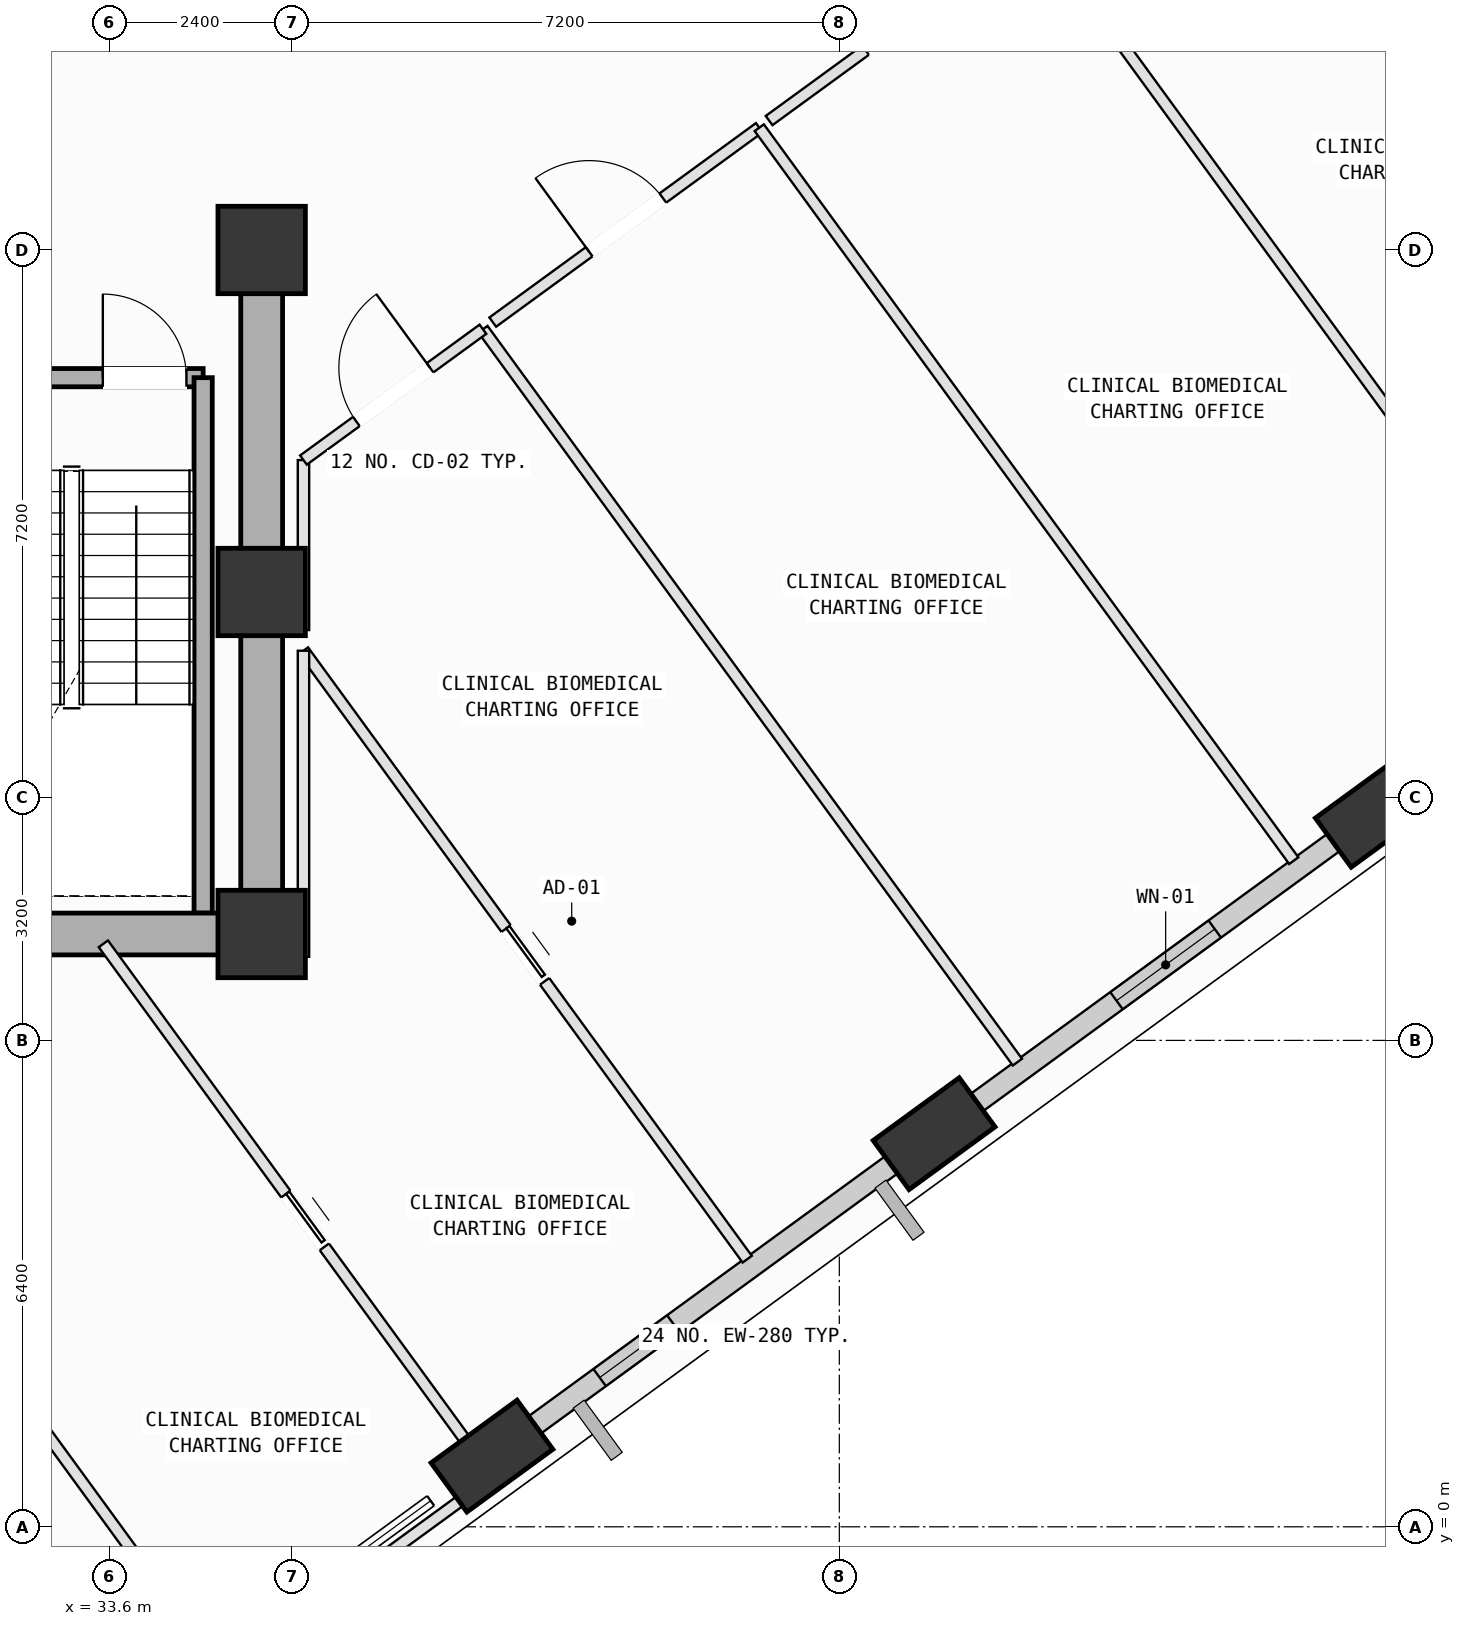
"""IFC4 building model, lengths in metres.
Left out: names, types, materials, properties, quantities, classifications, styles, units other than length and angle.
Written with IfcOpenShell. Run it as: python <this file> out.ifc"""

import sys

from ifc_helpers import new_model, si_unit, direction, frame, frame_2d, origin, origin_2d, place, context, subcontext, project, spatial, rectangle, extrude, element, fill, save


model = new_model("IFC4")
c1 = context("Model", 3, precision=1e-05, world=origin(), true_north=direction((0.0, 1.0)))
c2 = subcontext(c1, "Body", "Model", "MODEL_VIEW")
j1 = project(units=[si_unit("LENGTHUNIT", "METRE"), si_unit("PLANEANGLEUNIT", "RADIAN")], contexts=[c1])
p1 = place(None, origin())
s1 = spatial("IfcSite", under=j1, at=p1, CompositionType="ELEMENT")
p2 = place(p1, origin())
s2 = spatial("IfcBuilding", under=s1, at=p2, CompositionType="ELEMENT")
p3 = place(p2, frame((0.0, 0.0, 177.8)))
s3 = spatial("IfcBuildingStorey", under=s2, at=p3, CompositionType="ELEMENT", Elevation=177.8)
for number, where, z_axis, x_axis in (
    (1, (35.6, 7.8, 0.0), (0.0, 0.0, 1.0), (1.0, 0.0, 0.0)),
    (2, (35.6, 12.3, 0.0), (0.0, 0.0, 1.0), (1.0, 0.0, 0.0)),
    (3, (35.6, 16.8, 0.0), (0.0, 0.0, 1.0), (1.0, 0.0, 0.0)),
):
    element("IfcColumn", number, at=place(p3, frame(where, z_axis=z_axis, x_axis=x_axis)), inside=s3, PredefinedType="COLUMN", context=c2, shape_type="SweptSolid", body=[
        extrude(rectangle(XDim=1.15, YDim=1.15, at=origin_2d()), origin(), (0.0, 0.0, 1.0), 4.0),
    ])
p4 = place(p3, frame((38.63, 0.93, 0.002), z_axis=(0.098283042881, 0.021516510315, 0.994925868226), x_axis=(-0.745440461571, 0.663931067812, 0.059279469018)))
e4 = element("IfcColumn", 4, at=p4, inside=s3, PredefinedType="COLUMN", context=c2, shape_type="SweptSolid", body=[
    extrude(rectangle(XDim=1.4, YDim=0.8, at=origin_2d()), origin(), (0.0, 0.0, 1.0), 4.017),
])
p5 = place(p3, frame((44.448, 5.173, 0.002), z_axis=(0.0805984637, 0.045439284818, 0.995710379098), x_axis=(-0.907854816297, 0.415725530239, 0.054515282577)))
e5 = element("IfcColumn", 5, at=p5, inside=s3, PredefinedType="COLUMN", context=c2, shape_type="SweptSolid", body=[
    extrude(rectangle(XDim=1.4, YDim=0.8, at=origin_2d()), origin(), (0.0, 0.0, 1.0), 4.014),
])
p6 = place(p3, frame((50.265, 9.415, 0.002), z_axis=(0.062891068015, 0.069277491749, 0.995613048679), x_axis=(-0.992538081723, 0.108761006327, 0.055128938255)))
e6 = element("IfcColumn", 6, at=p6, inside=s3, PredefinedType="COLUMN", context=c2, shape_type="SweptSolid", body=[
    extrude(rectangle(XDim=1.4, YDim=0.8, at=origin_2d()), origin(), (0.0, 0.0, 1.0), 4.014),
])
p7 = place(p3, frame((44.196, 4.989, 0.0), z_axis=(0.0, 0.0, 1.0), x_axis=(-0.80798960604, -0.589196738392, 0.0)))
e7 = element("IfcWall", 7, at=p7, inside=s3, PredefinedType="SOLIDWALL", context=c2, shape_type="SweptSolid", body=[
    extrude(rectangle(XDim=6.214, YDim=0.28, at=frame_2d((3.107, 0.0))), origin(), (0.0, 0.0, 1.0), 3.265),
])
p8 = place(p7, frame((3.935, 0.0, 0.75)))
e8 = element("IfcOpeningElement", 8, at=p8, cuts=e7, PredefinedType="OPENING", context=c2, shape_type="SweptSolid", body=[
    extrude(rectangle(XDim=1.2, YDim=1.75, at=frame_2d((0.6, 0.875))), frame((0.0, 0.15, 0.0), z_axis=(0.0, -1.0, 0.0), x_axis=(1.0, 0.0, 0.0)), (0.0, 0.0, 1.0), 0.3),
])
p9 = place(p3, frame((50.014, 9.232, 0.0), z_axis=(0.0, 0.0, 1.0), x_axis=(-0.808000900578, -0.589181249417, 0.0)))
e9 = element("IfcWall", 9, at=p9, inside=s3, PredefinedType="SOLIDWALL", context=c2, shape_type="SweptSolid", body=[
    extrude(rectangle(XDim=6.209, YDim=0.28, at=frame_2d((3.104, 0.0))), origin(), (0.0, 0.0, 1.0), 3.265),
])
p10 = place(p9, frame((2.319, 0.0, 0.75)))
e10 = element("IfcOpeningElement", 10, at=p10, cuts=e9, PredefinedType="OPENING", context=c2, shape_type="SweptSolid", body=[
    extrude(rectangle(XDim=1.6, YDim=1.95, at=frame_2d((0.8, 0.975))), frame((0.0, 0.15, 0.0), z_axis=(0.0, -1.0, 0.0), x_axis=(1.0, 0.0, 0.0)), (0.0, 0.0, 1.0), 0.3),
])
p11 = place(p3, frame((31.37, 15.12, 0.0), z_axis=(0.0, 0.0, 1.0), x_axis=(1.0, 0.0, 0.0)))
e11 = element("IfcWall", 11, at=p11, inside=s3, PredefinedType="SOLIDWALL", context=c2, shape_type="SweptSolid", body=[
    extrude(rectangle(XDim=3.46, YDim=0.24, at=frame_2d((1.73, 0.0))), origin(), (0.0, 0.0, 1.0), 3.78),
])
p12 = place(p11, frame((2.14, 0.0, 0.0)))
e12 = element("IfcOpeningElement", 12, at=p12, cuts=e11, PredefinedType="OPENING", context=c2, shape_type="SweptSolid", body=[
    extrude(rectangle(XDim=1.1, YDim=2.15, at=frame_2d((0.55, 1.075))), frame((0.0, 0.13, 0.0), z_axis=(0.0, -1.0, 0.0), x_axis=(1.0, 0.0, 0.0)), (0.0, 0.0, 1.0), 0.26),
])
p13 = place(p3, frame((34.83, 15.12, 0.0), z_axis=(0.0, 0.0, 1.0), x_axis=(0.0, -1.0, 0.0)))
e13 = element("IfcWall", 13, at=p13, inside=s3, PredefinedType="SOLIDWALL", context=c2, shape_type="SweptSolid", body=[
    extrude(rectangle(XDim=7.045, YDim=0.24, at=frame_2d((3.522, 0.0))), origin(), (0.0, 0.0, 1.0), 3.78),
])
p14 = place(p3, frame((24.8, 7.8, 0.0), z_axis=(0.0, 0.0, 1.0), x_axis=(1.0, 0.0, 0.0)))
e14 = element("IfcWall", 14, at=p14, inside=s3, PredefinedType="SHEAR", context=c2, shape_type="SweptSolid", body=[
    extrude(rectangle(XDim=10.8, YDim=0.55, at=frame_2d((5.4, 0.0))), origin(), (0.0, 0.0, 1.0), 3.78),
])
p15 = place(p3, frame((35.6, 7.8, 0.0), z_axis=(0.0, 0.0, 1.0), x_axis=(0.0, 1.0, 0.0)))
e15 = element("IfcWall", 15, at=p15, inside=s3, PredefinedType="SHEAR", context=c2, shape_type="SweptSolid", body=[
    extrude(rectangle(XDim=9.0, YDim=0.55, at=frame_2d((4.5, 0.0))), origin(), (0.0, 0.0, 1.0), 3.78),
])
p16 = place(p3, frame((28.07, 7.671, 0.0), z_axis=(0.0, 0.0, 1.0), x_axis=(0.589263140304, -0.807941180705, 0.0)))
e16 = element("IfcWall", 16, at=p16, inside=s3, PredefinedType="PARTITIONING", context=c2, shape_type="SweptSolid", body=[
    extrude(rectangle(XDim=11.898, YDim=0.15, at=frame_2d((5.949, 0.0))), origin(), (0.0, 0.0, 1.0), 3.78),
])
p17 = place(p16, frame((5.704, 0.0, 0.0)))
e17 = element("IfcOpeningElement", 17, at=p17, cuts=e16, PredefinedType="OPENING", context=c2, shape_type="SweptSolid", body=[
    extrude(rectangle(XDim=0.86, YDim=2.06, at=frame_2d((0.43, 1.03))), frame((0.0, 0.085, 0.0), z_axis=(0.0, -1.0, 0.0), x_axis=(1.0, 0.0, 0.0)), (0.0, 0.0, 1.0), 0.17),
])
p18 = place(p3, frame((38.636, 0.65, 0.0), z_axis=(0.0, 0.0, 1.0), x_axis=(-0.808045791303, -0.589119681523, 0.0)))
e18 = element("IfcWall", 18, at=p18, inside=s3, PredefinedType="PARTITIONING", context=c2, shape_type="SweptSolid", body=[
    extrude(rectangle(XDim=4.24, YDim=0.15, at=frame_2d((2.12, 0.0))), origin(), (0.0, 0.0, 1.0), 3.265),
])
p19 = place(p3, frame((33.517, 7.671, 0.0), z_axis=(0.0, 0.0, 1.0), x_axis=(0.589139101628, -0.808031632384, 0.0)))
e19 = element("IfcWall", 19, at=p19, inside=s3, PredefinedType="PARTITIONING", context=c2, shape_type="SweptSolid", body=[
    extrude(rectangle(XDim=8.639, YDim=0.15, at=frame_2d((4.32, 0.0))), origin(), (0.0, 0.0, 1.0), 3.78),
])
p20 = place(p19, frame((4.075, 0.0, 0.0)))
e20 = element("IfcOpeningElement", 20, at=p20, cuts=e19, PredefinedType="OPENING", context=c2, shape_type="SweptSolid", body=[
    extrude(rectangle(XDim=0.86, YDim=2.06, at=frame_2d((0.43, 1.03))), frame((0.0, 0.085, 0.0), z_axis=(0.0, -1.0, 0.0), x_axis=(1.0, 0.0, 0.0)), (0.0, 0.0, 1.0), 0.17),
])
p21 = place(p3, frame((36.15, 11.527, 0.0), z_axis=(0.0, 0.0, 1.0), x_axis=(0.589195281256, -0.8079906686, 0.0)))
e21 = element("IfcWall", 21, at=p21, inside=s3, PredefinedType="PARTITIONING", context=c2, shape_type="SweptSolid", body=[
    extrude(rectangle(XDim=9.909, YDim=0.15, at=frame_2d((4.954, 0.0))), origin(), (0.0, 0.0, 1.0), 3.78),
])
p22 = place(p21, frame((4.524, 0.0, 0.0)))
e22 = element("IfcOpeningElement", 22, at=p22, cuts=e21, PredefinedType="OPENING", context=c2, shape_type="SweptSolid", body=[
    extrude(rectangle(XDim=0.86, YDim=2.06, at=frame_2d((0.43, 1.03))), frame((0.0, 0.085, 0.0), z_axis=(0.0, -1.0, 0.0), x_axis=(1.0, 0.0, 0.0)), (0.0, 0.0, 1.0), 0.17),
])
p23 = place(p3, frame((39.31, 1.142, 0.0), z_axis=(0.0, 0.0, 1.0), x_axis=(-0.807530243719, -0.589826165475, 0.0)))
e23 = element("IfcWall", 23, at=p23, inside=s3, PredefinedType="PARTITIONING", context=c2, shape_type="SweptSolid", body=[
    extrude(rectangle(XDim=0.675, YDim=0.15, at=frame_2d((0.337, 0.0))), origin(), (0.0, 0.0, 1.0), 3.265),
])
p24 = place(p3, frame((35.6, 7.5, 0.0), z_axis=(0.0, 0.0, 1.0), x_axis=(1.0, 0.0, 0.0)))
e24 = element("IfcWall", 24, at=p24, inside=s3, PredefinedType="PARTITIONING", context=c2, shape_type="SweptSolid", body=[
    extrude(rectangle(XDim=0.55, YDim=0.15, at=frame_2d((0.275, 0.0))), origin(), (0.0, 0.0, 1.0), 3.065),
])
p25 = place(p3, frame((36.15, 7.5, 0.0), z_axis=(0.0, 0.0, 1.0), x_axis=(0.0, 1.0, 0.0)))
e25 = element("IfcWall", 25, at=p25, inside=s3, PredefinedType="PARTITIONING", context=c2, shape_type="SweptSolid", body=[
    extrude(rectangle(XDim=4.027, YDim=0.15, at=frame_2d((2.014, 0.0))), origin(), (0.0, 0.0, 1.0), 3.78),
])
p26 = place(p3, frame((38.511, 15.757, 0.0), z_axis=(0.0, 0.0, 1.0), x_axis=(0.589203876201, -0.807984401006, 0.0)))
e26 = element("IfcWall", 26, at=p26, inside=s3, PredefinedType="PARTITIONING", context=c2, shape_type="SweptSolid", body=[
    extrude(rectangle(XDim=11.935, YDim=0.15, at=frame_2d((5.967, 0.0))), origin(), (0.0, 0.0, 1.0), 3.78),
])
p27 = place(p3, frame((45.132, 5.388, 0.0), z_axis=(0.0, 0.0, 1.0), x_axis=(-0.808053936912, -0.589108508715, 0.0)))
e27 = element("IfcWall", 27, at=p27, inside=s3, PredefinedType="PARTITIONING", context=c2, shape_type="SweptSolid", body=[
    extrude(rectangle(XDim=0.991, YDim=0.15, at=frame_2d((0.496, 0.0))), origin(), (0.0, 0.0, 1.0), 3.265),
])
p28 = place(p3, frame((36.15, 11.799, 0.0), z_axis=(0.0, 0.0, 1.0), x_axis=(0.0, 1.0, 0.0)))
e28 = element("IfcWall", 28, at=p28, inside=s3, PredefinedType="PARTITIONING", context=c2, shape_type="SweptSolid", body=[
    extrude(rectangle(XDim=2.237, YDim=0.15, at=frame_2d((1.118, 0.0))), origin(), (0.0, 0.0, 1.0), 3.78),
])
p29 = place(p3, frame((36.15, 14.036, 0.0), z_axis=(0.0, 0.0, 1.0), x_axis=(0.808077964092, 0.589075550289, 0.0)))
e29 = element("IfcWall", 29, at=p29, inside=s3, PredefinedType="PARTITIONING", context=c2, shape_type="SweptSolid", body=[
    extrude(rectangle(XDim=2.922, YDim=0.15, at=frame_2d((1.461, 0.0))), origin(), (0.0, 0.0, 1.0), 3.78),
])
p30 = place(p29, frame((0.861, 0.0, 0.0)))
e30 = element("IfcOpeningElement", 30, at=p30, cuts=e29, PredefinedType="OPENING", context=c2, shape_type="SweptSolid", body=[
    extrude(rectangle(XDim=1.2, YDim=2.15, at=frame_2d((0.6, 1.075))), frame((0.0, 0.085, 0.0), z_axis=(0.0, -1.0, 0.0), x_axis=(1.0, 0.0, 0.0)), (0.0, 0.0, 1.0), 0.17),
])
p31 = place(p3, frame((38.64, 15.851, 0.0), z_axis=(0.0, 0.0, 1.0), x_axis=(0.807940029347, 0.589264718933, 0.0)))
e31 = element("IfcWall", 31, at=p31, inside=s3, PredefinedType="PARTITIONING", context=c2, shape_type="SweptSolid", body=[
    extrude(rectangle(XDim=4.341, YDim=0.15, at=frame_2d((2.17, 0.0))), origin(), (0.0, 0.0, 1.0), 3.78),
])
p32 = place(p31, frame((1.57, 0.0, 0.0)))
e32 = element("IfcOpeningElement", 32, at=p32, cuts=e31, PredefinedType="OPENING", context=c2, shape_type="SweptSolid", body=[
    extrude(rectangle(XDim=1.2, YDim=2.15, at=frame_2d((0.6, 1.075))), frame((0.0, 0.085, 0.0), z_axis=(0.0, -1.0, 0.0), x_axis=(1.0, 0.0, 0.0)), (0.0, 0.0, 1.0), 0.17),
])
p33 = place(p3, frame((42.147, 18.409, 0.0), z_axis=(0.0, 0.0, 1.0), x_axis=(0.589164923699, -0.808012804776, 0.0)))
e33 = element("IfcWall", 33, at=p33, inside=s3, PredefinedType="PARTITIONING", context=c2, shape_type="SweptSolid", body=[
    extrude(rectangle(XDim=11.936, YDim=0.15, at=frame_2d((5.968, 0.0))), origin(), (0.0, 0.0, 1.0), 3.78),
])
p34 = place(p3, frame((42.276, 18.503, 0.0), z_axis=(0.0, 0.0, 1.0), x_axis=(0.808020361036, 0.589154560494, 0.0)))
e34 = element("IfcWall", 34, at=p34, inside=s3, PredefinedType="PARTITIONING", context=c2, shape_type="SweptSolid", body=[
    extrude(rectangle(XDim=4.34, YDim=0.15, at=frame_2d((2.17, 0.0))), origin(), (0.0, 0.0, 1.0), 3.78),
])
p35 = place(p34, frame((1.57, 0.0, 0.0)))
e35 = element("IfcOpeningElement", 35, at=p35, cuts=e34, PredefinedType="OPENING", context=c2, shape_type="SweptSolid", body=[
    extrude(rectangle(XDim=1.2, YDim=2.15, at=frame_2d((0.6, 1.075))), frame((0.0, 0.085, 0.0), z_axis=(0.0, -1.0, 0.0), x_axis=(1.0, 0.0, 0.0)), (0.0, 0.0, 1.0), 0.17),
])
p36 = place(p3, frame((45.783, 21.06, 0.0), z_axis=(0.0, 0.0, 1.0), x_axis=(0.589203876201, -0.807984401006, 0.0)))
e36 = element("IfcWall", 36, at=p36, inside=s3, PredefinedType="PARTITIONING", context=c2, shape_type="SweptSolid", body=[
    extrude(rectangle(XDim=11.935, YDim=0.15, at=frame_2d((5.967, 0.0))), origin(), (0.0, 0.0, 1.0), 3.78),
])
p37 = place(p3, frame((50.949, 9.629, 0.0), z_axis=(0.0, 0.0, 1.0), x_axis=(-0.808181158002, -0.588933965611, 0.0)))
e37 = element("IfcWall", 37, at=p37, inside=s3, PredefinedType="PARTITIONING", context=c2, shape_type="SweptSolid", body=[
    extrude(rectangle(XDim=0.99, YDim=0.15, at=frame_2d((0.495, 0.0))), origin(), (0.0, 0.0, 1.0), 3.265),
])
p38 = place(p3, frame((49.419, 23.711, 0.0), z_axis=(0.0, 0.0, 1.0), x_axis=(0.589193791038, -0.807991755281, 0.0)))
e38 = element("IfcWall", 38, at=p38, inside=s3, PredefinedType="PARTITIONING", context=c2, shape_type="SweptSolid", body=[
    extrude(rectangle(XDim=12.28, YDim=0.15, at=frame_2d((6.14, 0.0))), origin(), (0.0, 0.0, 1.0), 3.78),
])
p39 = place(p8, origin())
e39 = element("IfcWindow", 39, at=p39, inside=s3, PartitioningType="SINGLE_PANEL", PredefinedType="WINDOW", context=c2, shape_type="SweptSolid", body=[
    extrude(rectangle(XDim=1.2, YDim=1.75, at=frame_2d((0.6, 0.875))), frame((0.0, 0.03, 0.0), z_axis=(0.0, -1.0, 0.0), x_axis=(1.0, 0.0, 0.0)), (0.0, 0.0, 1.0), 0.06),
])
fill(e8, e39)
p40 = place(p10, origin())
e40 = element("IfcWindow", 40, at=p40, inside=s3, PartitioningType="SINGLE_PANEL", PredefinedType="WINDOW", context=c2, shape_type="SweptSolid", body=[
    extrude(rectangle(XDim=1.6, YDim=1.95, at=frame_2d((0.8, 0.975))), frame((0.0, 0.03, 0.0), z_axis=(0.0, -1.0, 0.0), x_axis=(1.0, 0.0, 0.0)), (0.0, 0.0, 1.0), 0.06),
])
fill(e10, e40)
p41 = place(p12, origin())
e41 = element("IfcDoor", 41, at=p41, inside=s3, OperationType="SINGLE_SWING_LEFT", PredefinedType="DOOR", context=c2, shape_type="SweptSolid", body=[
    extrude(rectangle(XDim=1.1, YDim=2.15, at=frame_2d((0.55, 1.075))), frame((0.0, 0.025, 0.0), z_axis=(0.0, -1.0, 0.0), x_axis=(1.0, 0.0, 0.0)), (0.0, 0.0, 1.0), 0.05),
])
fill(e12, e41)
p42 = place(p30, origin())
e42 = element("IfcDoor", 42, at=p42, inside=s3, OperationType="SINGLE_SWING_RIGHT", PredefinedType="DOOR", context=c2, shape_type="SweptSolid", body=[
    extrude(rectangle(XDim=1.2, YDim=2.15, at=frame_2d((0.6, 1.075))), frame((0.0, 0.025, 0.0), z_axis=(0.0, -1.0, 0.0), x_axis=(1.0, 0.0, 0.0)), (0.0, 0.0, 1.0), 0.05),
])
fill(e30, e42)
p43 = place(p32, origin())
e43 = element("IfcDoor", 43, at=p43, inside=s3, OperationType="SINGLE_SWING_LEFT", PredefinedType="DOOR", context=c2, shape_type="SweptSolid", body=[
    extrude(rectangle(XDim=1.2, YDim=2.15, at=frame_2d((0.6, 1.075))), frame((0.0, 0.025, 0.0), z_axis=(0.0, -1.0, 0.0), x_axis=(1.0, 0.0, 0.0)), (0.0, 0.0, 1.0), 0.05),
])
fill(e32, e43)
p44 = place(p35, origin())
e44 = element("IfcDoor", 44, at=p44, inside=s3, OperationType="SINGLE_SWING_LEFT", PredefinedType="DOOR", context=c2, shape_type="SweptSolid", body=[
    extrude(rectangle(XDim=1.2, YDim=2.15, at=frame_2d((0.6, 1.075))), frame((0.0, 0.025, 0.0), z_axis=(0.0, -1.0, 0.0), x_axis=(1.0, 0.0, 0.0)), (0.0, 0.0, 1.0), 0.05),
])
fill(e35, e44)
p45 = place(p22, origin())
e45 = element("IfcDoor", 45, at=p45, inside=s3, OperationType="SLIDING_TO_LEFT", PredefinedType="DOOR", context=c2, shape_type="SweptSolid", body=[
    extrude(rectangle(XDim=0.86, YDim=2.06, at=frame_2d((0.43, 1.03))), frame((0.0, 0.025, 0.0), z_axis=(0.0, -1.0, 0.0), x_axis=(1.0, 0.0, 0.0)), (0.0, 0.0, 1.0), 0.05),
])
fill(e22, e45)
p46 = place(p20, origin())
e46 = element("IfcDoor", 46, at=p46, inside=s3, OperationType="SLIDING_TO_LEFT", PredefinedType="DOOR", context=c2, shape_type="SweptSolid", body=[
    extrude(rectangle(XDim=0.86, YDim=2.06, at=frame_2d((0.43, 1.03))), frame((0.0, 0.025, 0.0), z_axis=(0.0, -1.0, 0.0), x_axis=(1.0, 0.0, 0.0)), (0.0, 0.0, 1.0), 0.05),
])
fill(e20, e46)
save(model, sys.argv[1])
